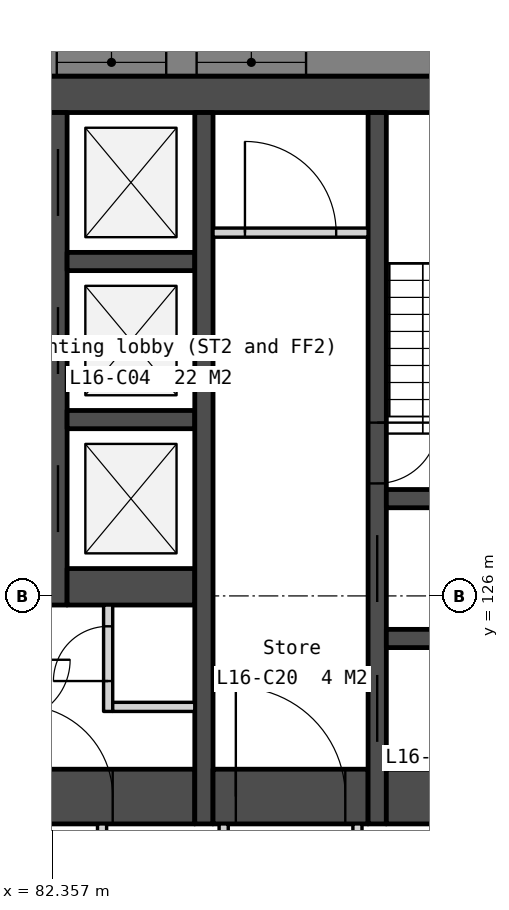
"""IFC4 building model, lengths in metres.
Left out: names, types, materials, properties, quantities, classifications, styles, units other than length and angle.
Written with IfcOpenShell. Run it as: python <this file> out.ifc"""

import sys

from ifc_helpers import new_model, si_unit, direction, frame, frame_2d, origin, place, context, subcontext, project, spatial, polyline, rectangle, outline, extrude, element, fill, save


model = new_model("IFC4")
c1 = context("Model", 3, precision=1e-05, world=origin(), true_north=direction((0.0, 1.0)))
c2 = subcontext(c1, "Body", "Model", "MODEL_VIEW")
j1 = project(units=[si_unit("LENGTHUNIT", "METRE"), si_unit("PLANEANGLEUNIT", "RADIAN")], contexts=[c1])
p1 = place(None, origin())
s1 = spatial("IfcSite", under=j1, at=p1, CompositionType="ELEMENT")
p2 = place(p1, origin())
s2 = spatial("IfcBuilding", under=s1, at=p2, CompositionType="ELEMENT")
p3 = place(p2, frame((0.0, 0.0, 70.0)))
s3 = spatial("IfcBuildingStorey", under=s2, at=p3, CompositionType="ELEMENT", Elevation=70.0)
p4 = place(p3, frame((66.0, 134.25, 0.0), z_axis=(0.0, 0.0, 1.0), x_axis=(1.0, 0.0, 0.0)))
e1 = element("IfcWall", 1, at=p4, inside=s3, PredefinedType="SOLIDWALL", context=c2, shape_type="SweptSolid", body=[
    extrude(rectangle(XDim=28.0, YDim=0.6, at=frame_2d((14.0, 0.0))), origin(), (0.0, 0.0, 1.0), 3.35),
])
p5 = place(p3, frame((81.8, 122.7, 0.0), z_axis=(0.0, 0.0, 1.0), x_axis=(1.0, 0.0, 0.0)))
e2 = element("IfcWall", 2, at=p5, inside=s3, PredefinedType="SOLIDWALL", context=c2, shape_type="SweptSolid", body=[
    extrude(rectangle(XDim=2.9, YDim=0.9, at=frame_2d((1.45, 0.0))), origin(), (0.0, 0.0, 1.0), 3.35),
])
p6 = place(p5, frame((0.05, 0.0, 0.0)))
e3 = element("IfcOpeningElement", 3, at=p6, cuts=e2, PredefinedType="OPENING", context=c2, shape_type="SweptSolid", body=[
    extrude(rectangle(XDim=1.5, YDim=2.1, at=frame_2d((0.75, 1.05))), frame((0.0, 0.46, 0.0), z_axis=(0.0, -1.0, 0.0), x_axis=(1.0, 0.0, 0.0)), (0.0, 0.0, 1.0), 0.92),
])
p7 = place(p3, frame((82.45, 133.95, 0.0), z_axis=(0.0, 0.0, 1.0), x_axis=(0.0, -1.0, 0.0)))
e4 = element("IfcWall", 4, at=p7, inside=s3, PredefinedType="SOLIDWALL", context=c2, shape_type="SweptSolid", body=[
    extrude(rectangle(XDim=8.1, YDim=0.3, at=frame_2d((4.05, 0.0))), origin(), (0.0, 0.0, 1.0), 3.35),
])
p8 = place(p7, frame((0.6, 0.0, 0.0)))
e5 = element("IfcOpeningElement", 5, at=p8, cuts=e4, PredefinedType="OPENING", context=c2, shape_type="SweptSolid", body=[
    extrude(rectangle(XDim=1.1, YDim=2.1, at=frame_2d((0.55, 1.05))), frame((0.0, 0.16, 0.0), z_axis=(0.0, -1.0, 0.0), x_axis=(1.0, 0.0, 0.0)), (0.0, 0.0, 1.0), 0.32),
])
p9 = place(p7, frame((3.2, 0.0, 0.0)))
e6 = element("IfcOpeningElement", 6, at=p9, cuts=e4, PredefinedType="OPENING", context=c2, shape_type="SweptSolid", body=[
    extrude(rectangle(XDim=1.1, YDim=2.1, at=frame_2d((0.55, 1.05))), frame((0.0, 0.16, 0.0), z_axis=(0.0, -1.0, 0.0), x_axis=(1.0, 0.0, 0.0)), (0.0, 0.0, 1.0), 0.32),
])
p10 = place(p7, frame((5.8, 0.0, 0.0)))
e7 = element("IfcOpeningElement", 7, at=p10, cuts=e4, PredefinedType="OPENING", context=c2, shape_type="SweptSolid", body=[
    extrude(rectangle(XDim=1.1, YDim=2.1, at=frame_2d((0.55, 1.05))), frame((0.0, 0.16, 0.0), z_axis=(0.0, -1.0, 0.0), x_axis=(1.0, 0.0, 0.0)), (0.0, 0.0, 1.0), 0.32),
])
for number, where, z_axis, x_axis in (
    (8, (82.6, 131.5, 0.0), (0.0, 0.0, 1.0), (1.0, 0.0, 0.0)),
    (9, (82.6, 128.9, 0.0), (0.0, 0.0, 1.0), (1.0, 0.0, 0.0)),
):
    element("IfcWall", number, at=place(p3, frame(where, z_axis=z_axis, x_axis=x_axis)), inside=s3, PredefinedType="SOLIDWALL", context=c2, shape_type="SweptSolid", body=[
        extrude(rectangle(XDim=2.1, YDim=0.3, at=frame_2d((1.05, 0.0))), origin(), (0.0, 0.0, 1.0), 3.35),
    ])
p11 = place(p3, frame((82.6, 126.15, 0.0), z_axis=(0.0, 0.0, 1.0), x_axis=(1.0, 0.0, 0.0)))
e10 = element("IfcWall", 10, at=p11, inside=s3, PredefinedType="SOLIDWALL", context=c2, shape_type="SweptSolid", body=[
    extrude(rectangle(XDim=2.1, YDim=0.6, at=frame_2d((1.05, 0.0))), origin(), (0.0, 0.0, 1.0), 3.35),
])
p12 = place(p3, frame((83.175, 122.25, 0.0), z_axis=(0.0, 0.0, 1.0), x_axis=(0.0, -1.0, 0.0)))
e11 = element("IfcWall", 11, at=p12, inside=s3, PredefinedType="PARTITIONING", context=c2, shape_type="SweptSolid", body=[
    extrude(rectangle(XDim=2.1, YDim=0.15, at=frame_2d((1.05, 0.0))), origin(), (0.0, 0.0, 1.0), 3.35),
])
p13 = place(p3, frame((83.275, 125.85, 0.0), z_axis=(0.0, 0.0, 1.0), x_axis=(0.0, -1.0, 0.0)))
e12 = element("IfcWall", 12, at=p13, inside=s3, PredefinedType="PARTITIONING", context=c2, shape_type="SweptSolid", body=[
    extrude(rectangle(XDim=1.75, YDim=0.15, at=frame_2d((0.875, 0.0))), origin(), (0.0, 0.0, 1.0), 3.35),
])
p14 = place(p13, frame((0.35, 0.0, 0.0)))
e13 = element("IfcOpeningElement", 13, at=p14, cuts=e12, PredefinedType="OPENING", context=c2, shape_type="SweptSolid", body=[
    extrude(rectangle(XDim=0.9, YDim=2.1, at=frame_2d((0.45, 1.05))), frame((0.0, 0.085, 0.0), z_axis=(0.0, -1.0, 0.0), x_axis=(1.0, 0.0, 0.0)), (0.0, 0.0, 1.0), 0.17),
])
p15 = place(p3, frame((83.35, 124.175, 0.0), z_axis=(0.0, 0.0, 1.0), x_axis=(1.0, 0.0, 0.0)))
e14 = element("IfcWall", 14, at=p15, inside=s3, PredefinedType="PARTITIONING", context=c2, shape_type="SweptSolid", body=[
    extrude(rectangle(XDim=1.35, YDim=0.15, at=frame_2d((0.675, 0.0))), origin(), (0.0, 0.0, 1.0), 3.35),
])
p16 = place(p3, frame((84.85, 133.95, 0.0), z_axis=(0.0, 0.0, 1.0), x_axis=(0.0, -1.0, 0.0)))
e15 = element("IfcWall", 15, at=p16, inside=s3, PredefinedType="SOLIDWALL", context=c2, shape_type="SweptSolid", body=[
    extrude(rectangle(XDim=11.7, YDim=0.3, at=frame_2d((5.85, 0.0))), origin(), (0.0, 0.0, 1.0), 3.35),
])
p17 = place(p3, frame((85.0, 131.975, 0.0), z_axis=(0.0, 0.0, 1.0), x_axis=(1.0, 0.0, 0.0)))
e16 = element("IfcWall", 16, at=p17, inside=s3, PredefinedType="PARTITIONING", context=c2, shape_type="SweptSolid", body=[
    extrude(rectangle(XDim=2.55, YDim=0.15, at=frame_2d((1.275, 0.0))), origin(), (0.0, 0.0, 1.0), 3.35),
])
p18 = place(p17, frame((0.525, 0.0, 0.0)))
e17 = element("IfcOpeningElement", 17, at=p18, cuts=e16, PredefinedType="OPENING", context=c2, shape_type="SweptSolid", body=[
    extrude(rectangle(XDim=1.5, YDim=2.1, at=frame_2d((0.75, 1.05))), frame((0.0, 0.085, 0.0), z_axis=(0.0, -1.0, 0.0), x_axis=(1.0, 0.0, 0.0)), (0.0, 0.0, 1.0), 0.17),
])
p19 = place(p3, frame((85.0, 122.7, 0.0), z_axis=(0.0, 0.0, 1.0), x_axis=(1.0, 0.0, 0.0)))
e18 = element("IfcWall", 18, at=p19, inside=s3, PredefinedType="SOLIDWALL", context=c2, shape_type="SweptSolid", body=[
    extrude(rectangle(XDim=2.55, YDim=0.9, at=frame_2d((1.275, 0.0))), origin(), (0.0, 0.0, 1.0), 3.35),
])
p20 = place(p19, frame((0.375, 0.0, 0.0)))
e19 = element("IfcOpeningElement", 19, at=p20, cuts=e18, PredefinedType="OPENING", context=c2, shape_type="SweptSolid", body=[
    extrude(rectangle(XDim=1.8, YDim=2.1, at=frame_2d((0.9, 1.05))), frame((0.0, 0.46, 0.0), z_axis=(0.0, -1.0, 0.0), x_axis=(1.0, 0.0, 0.0)), (0.0, 0.0, 1.0), 0.92),
])
p21 = place(p3, frame((85.175, 122.25, 0.0), z_axis=(0.0, 0.0, 1.0), x_axis=(0.0, -1.0, 0.0)))
e20 = element("IfcWall", 20, at=p21, inside=s3, PredefinedType="PARTITIONING", context=c2, shape_type="SweptSolid", body=[
    extrude(rectangle(XDim=2.1, YDim=0.15, at=frame_2d((1.05, 0.0))), origin(), (0.0, 0.0, 1.0), 3.35),
])
p22 = place(p21, frame((0.55, 0.0, 0.0)))
e21 = element("IfcOpeningElement", 21, at=p22, cuts=e20, PredefinedType="OPENING", context=c2, shape_type="SweptSolid", body=[
    extrude(rectangle(XDim=1.0, YDim=2.1, at=frame_2d((0.5, 1.05))), frame((0.0, 0.085, 0.0), z_axis=(0.0, -1.0, 0.0), x_axis=(1.0, 0.0, 0.0)), (0.0, 0.0, 1.0), 0.17),
])
p23 = place(p3, frame((87.375, 122.25, 0.0), z_axis=(0.0, 0.0, 1.0), x_axis=(0.0, -1.0, 0.0)))
e22 = element("IfcWall", 22, at=p23, inside=s3, PredefinedType="PARTITIONING", context=c2, shape_type="SweptSolid", body=[
    extrude(rectangle(XDim=2.1, YDim=0.15, at=frame_2d((1.05, 0.0))), origin(), (0.0, 0.0, 1.0), 3.35),
])
p24 = place(p3, frame((87.7, 133.95, 0.0), z_axis=(0.0, 0.0, 1.0), x_axis=(0.0, -1.0, 0.0)))
e23 = element("IfcWall", 23, at=p24, inside=s3, PredefinedType="SOLIDWALL", context=c2, shape_type="SweptSolid", body=[
    extrude(rectangle(XDim=11.7, YDim=0.3, at=frame_2d((5.85, 0.0))), origin(), (0.0, 0.0, 1.0), 3.35),
])
p25 = place(p24, frame((6.95, 0.0, 0.0)))
e24 = element("IfcOpeningElement", 24, at=p25, cuts=e23, PredefinedType="OPENING", context=c2, shape_type="SweptSolid", body=[
    extrude(rectangle(XDim=1.1, YDim=2.1, at=frame_2d((0.55, 1.05))), frame((0.0, 0.16, 0.0), z_axis=(0.0, -1.0, 0.0), x_axis=(1.0, 0.0, 0.0)), (0.0, 0.0, 1.0), 0.32),
])
p26 = place(p24, frame((5.1, 0.0, 0.0)))
e25 = element("IfcOpeningElement", 25, at=p26, cuts=e23, PredefinedType="OPENING", context=c2, shape_type="SweptSolid", body=[
    extrude(rectangle(XDim=1.0, YDim=2.1, at=frame_2d((0.5, 1.05))), frame((0.0, 0.16, 0.0), z_axis=(0.0, -1.0, 0.0), x_axis=(1.0, 0.0, 0.0)), (0.0, 0.0, 1.0), 0.32),
])
p27 = place(p24, frame((9.25, 0.0, 0.0)))
e26 = element("IfcOpeningElement", 26, at=p27, cuts=e23, PredefinedType="OPENING", context=c2, shape_type="SweptSolid", body=[
    extrude(rectangle(XDim=1.1, YDim=2.1, at=frame_2d((0.55, 1.05))), frame((0.0, 0.16, 0.0), z_axis=(0.0, -1.0, 0.0), x_axis=(1.0, 0.0, 0.0)), (0.0, 0.0, 1.0), 0.32),
])
for number, where, z_axis, x_axis in (
    (27, (87.85, 127.6, 0.0), (0.0, 0.0, 1.0), (1.0, 0.0, 0.0)),
    (28, (87.85, 125.3, 0.0), (0.0, 0.0, 1.0), (1.0, 0.0, 0.0)),
):
    element("IfcWall", number, at=place(p3, frame(where, z_axis=z_axis, x_axis=x_axis)), inside=s3, PredefinedType="SOLIDWALL", context=c2, shape_type="SweptSolid", body=[
        extrude(rectangle(XDim=2.55, YDim=0.3, at=frame_2d((1.275, 0.0))), origin(), (0.0, 0.0, 1.0), 3.35),
    ])
p28 = place(p3, frame((87.85, 122.7, 0.0), z_axis=(0.0, 0.0, 1.0), x_axis=(1.0, 0.0, 0.0)))
e29 = element("IfcWall", 29, at=p28, inside=s3, PredefinedType="SOLIDWALL", context=c2, shape_type="SweptSolid", body=[
    extrude(rectangle(XDim=2.55, YDim=0.9, at=frame_2d((1.275, 0.0))), origin(), (0.0, 0.0, 1.0), 3.35),
])
p29 = place(p3, frame((102.4, 134.775, -0.15), z_axis=(0.0, 0.0, 1.0), x_axis=(-1.0, 0.0, 0.0)))
e30 = element("IfcWall", 30, at=p29, inside=s3, PredefinedType="SOLIDWALL", context=c2, shape_type="SweptSolid", body=[
    extrude(outline(polyline([(44.8, 0.0), (44.8, 3.5), (0.0, 3.5), (0.0, 0.0), (44.8, 0.0)])), frame((0.0, 0.225, 0.0), z_axis=(0.0, -1.0, 0.0), x_axis=(1.0, 0.0, 0.0)), (0.0, 0.0, 1.0), 0.45),
])
p30 = place(p29, frame((0.786, 0.0, 1.05)))
e31 = element("IfcOpeningElement", 31, at=p30, cuts=e30, PredefinedType="OPENING", context=c2, shape_type="SweptSolid", body=[
    extrude(rectangle(XDim=1.2, YDim=1.5, at=frame_2d((0.6, 0.75))), frame((0.0, 0.235, 0.0), z_axis=(0.0, -1.0, 0.0), x_axis=(1.0, 0.0, 0.0)), (0.0, 0.0, 1.0), 0.47),
])
p31 = place(p29, frame((6.91, 0.0, 1.05)))
e32 = element("IfcOpeningElement", 32, at=p31, cuts=e30, PredefinedType="OPENING", context=c2, shape_type="SweptSolid", body=[
    extrude(rectangle(XDim=1.8, YDim=1.5, at=frame_2d((0.9, 0.75))), frame((0.0, 0.235, 0.0), z_axis=(0.0, -1.0, 0.0), x_axis=(1.0, 0.0, 0.0)), (0.0, 0.0, 1.0), 0.47),
])
p32 = place(p29, frame((9.21, 0.0, 1.05)))
e33 = element("IfcOpeningElement", 33, at=p32, cuts=e30, PredefinedType="OPENING", context=c2, shape_type="SweptSolid", body=[
    extrude(rectangle(XDim=1.8, YDim=1.5, at=frame_2d((0.9, 0.75))), frame((0.0, 0.235, 0.0), z_axis=(0.0, -1.0, 0.0), x_axis=(1.0, 0.0, 0.0)), (0.0, 0.0, 1.0), 0.47),
])
p33 = place(p29, frame((15.87, 0.0, 1.05)))
e34 = element("IfcOpeningElement", 34, at=p33, cuts=e30, PredefinedType="OPENING", context=c2, shape_type="SweptSolid", body=[
    extrude(rectangle(XDim=1.8, YDim=1.5, at=frame_2d((0.9, 0.75))), frame((0.0, 0.235, 0.0), z_axis=(0.0, -1.0, 0.0), x_axis=(1.0, 0.0, 0.0)), (0.0, 0.0, 1.0), 0.47),
])
p34 = place(p29, frame((18.17, 0.0, 1.05)))
e35 = element("IfcOpeningElement", 35, at=p34, cuts=e30, PredefinedType="OPENING", context=c2, shape_type="SweptSolid", body=[
    extrude(rectangle(XDim=1.8, YDim=1.5, at=frame_2d((0.9, 0.75))), frame((0.0, 0.235, 0.0), z_axis=(0.0, -1.0, 0.0), x_axis=(1.0, 0.0, 0.0)), (0.0, 0.0, 1.0), 0.47),
])
p35 = place(p29, frame((24.83, 0.0, 1.05)))
e36 = element("IfcOpeningElement", 36, at=p35, cuts=e30, PredefinedType="OPENING", context=c2, shape_type="SweptSolid", body=[
    extrude(rectangle(XDim=1.8, YDim=1.5, at=frame_2d((0.9, 0.75))), frame((0.0, 0.235, 0.0), z_axis=(0.0, -1.0, 0.0), x_axis=(1.0, 0.0, 0.0)), (0.0, 0.0, 1.0), 0.47),
])
p36 = place(p29, frame((27.13, 0.0, 1.05)))
e37 = element("IfcOpeningElement", 37, at=p36, cuts=e30, PredefinedType="OPENING", context=c2, shape_type="SweptSolid", body=[
    extrude(rectangle(XDim=1.8, YDim=1.5, at=frame_2d((0.9, 0.75))), frame((0.0, 0.235, 0.0), z_axis=(0.0, -1.0, 0.0), x_axis=(1.0, 0.0, 0.0)), (0.0, 0.0, 1.0), 0.47),
])
p37 = place(p29, frame((33.79, 0.0, 1.05)))
e38 = element("IfcOpeningElement", 38, at=p37, cuts=e30, PredefinedType="OPENING", context=c2, shape_type="SweptSolid", body=[
    extrude(rectangle(XDim=1.8, YDim=1.5, at=frame_2d((0.9, 0.75))), frame((0.0, 0.235, 0.0), z_axis=(0.0, -1.0, 0.0), x_axis=(1.0, 0.0, 0.0)), (0.0, 0.0, 1.0), 0.47),
])
p38 = place(p29, frame((36.09, 0.0, 1.05)))
e39 = element("IfcOpeningElement", 39, at=p38, cuts=e30, PredefinedType="OPENING", context=c2, shape_type="SweptSolid", body=[
    extrude(rectangle(XDim=1.8, YDim=1.5, at=frame_2d((0.9, 0.75))), frame((0.0, 0.235, 0.0), z_axis=(0.0, -1.0, 0.0), x_axis=(1.0, 0.0, 0.0)), (0.0, 0.0, 1.0), 0.47),
])
p39 = place(p29, frame((42.814, 0.0, 1.05)))
e40 = element("IfcOpeningElement", 40, at=p39, cuts=e30, PredefinedType="OPENING", context=c2, shape_type="SweptSolid", body=[
    extrude(rectangle(XDim=1.2, YDim=1.5, at=frame_2d((0.6, 0.75))), frame((0.0, 0.235, 0.0), z_axis=(0.0, -1.0, 0.0), x_axis=(1.0, 0.0, 0.0)), (0.0, 0.0, 1.0), 0.47),
])
p40 = place(p3, frame((88.435, 99.831, -0.15), z_axis=(0.0, 0.0, 1.0), x_axis=(0.500000806382, 0.866024938219, 0.0)))
e41 = element("IfcWall", 41, at=p40, inside=s3, PredefinedType="SOLIDWALL", context=c2, shape_type="SweptSolid", body=[
    extrude(outline(polyline([(34.14, 3.5), (34.14, 0.0), (0.0, 0.0), (0.0, 3.5), (34.14, 3.5)])), frame((0.0, 0.225, 0.0), z_axis=(0.0, -1.0, 0.0), x_axis=(1.0, 0.0, 0.0)), (0.0, 0.0, 1.0), 0.45),
])
p41 = place(p40, frame((5.21, 0.0, 1.05)))
e42 = element("IfcOpeningElement", 42, at=p41, cuts=e41, PredefinedType="OPENING", context=c2, shape_type="SweptSolid", body=[
    extrude(rectangle(XDim=1.8, YDim=1.5, at=frame_2d((0.9, 0.75))), frame((0.0, 0.235, 0.0), z_axis=(0.0, -1.0, 0.0), x_axis=(1.0, 0.0, 0.0)), (0.0, 0.0, 1.0), 0.47),
])
p42 = place(p40, frame((7.51, 0.0, 1.05)))
e43 = element("IfcOpeningElement", 43, at=p42, cuts=e41, PredefinedType="OPENING", context=c2, shape_type="SweptSolid", body=[
    extrude(rectangle(XDim=1.8, YDim=1.5, at=frame_2d((0.9, 0.75))), frame((0.0, 0.235, 0.0), z_axis=(0.0, -1.0, 0.0), x_axis=(1.0, 0.0, 0.0)), (0.0, 0.0, 1.0), 0.47),
])
p43 = place(p40, frame((14.17, 0.0, 1.05)))
e44 = element("IfcOpeningElement", 44, at=p43, cuts=e41, PredefinedType="OPENING", context=c2, shape_type="SweptSolid", body=[
    extrude(rectangle(XDim=1.8, YDim=1.5, at=frame_2d((0.9, 0.75))), frame((0.0, 0.235, 0.0), z_axis=(0.0, -1.0, 0.0), x_axis=(1.0, 0.0, 0.0)), (0.0, 0.0, 1.0), 0.47),
])
p44 = place(p40, frame((16.47, 0.0, 1.05)))
e45 = element("IfcOpeningElement", 45, at=p44, cuts=e41, PredefinedType="OPENING", context=c2, shape_type="SweptSolid", body=[
    extrude(rectangle(XDim=1.8, YDim=1.5, at=frame_2d((0.9, 0.75))), frame((0.0, 0.235, 0.0), z_axis=(0.0, -1.0, 0.0), x_axis=(1.0, 0.0, 0.0)), (0.0, 0.0, 1.0), 0.47),
])
p45 = place(p40, frame((23.13, 0.0, 1.05)))
e46 = element("IfcOpeningElement", 46, at=p45, cuts=e41, PredefinedType="OPENING", context=c2, shape_type="SweptSolid", body=[
    extrude(rectangle(XDim=1.8, YDim=1.5, at=frame_2d((0.9, 0.75))), frame((0.0, 0.235, 0.0), z_axis=(0.0, -1.0, 0.0), x_axis=(1.0, 0.0, 0.0)), (0.0, 0.0, 1.0), 0.47),
])
p46 = place(p40, frame((25.43, 0.0, 1.05)))
e47 = element("IfcOpeningElement", 47, at=p46, cuts=e41, PredefinedType="OPENING", context=c2, shape_type="SweptSolid", body=[
    extrude(rectangle(XDim=1.8, YDim=1.5, at=frame_2d((0.9, 0.75))), frame((0.0, 0.235, 0.0), z_axis=(0.0, -1.0, 0.0), x_axis=(1.0, 0.0, 0.0)), (0.0, 0.0, 1.0), 0.47),
])
p47 = place(p40, frame((32.154, 0.0, 1.05)))
e48 = element("IfcOpeningElement", 48, at=p47, cuts=e41, PredefinedType="OPENING", context=c2, shape_type="SweptSolid", body=[
    extrude(rectangle(XDim=1.2, YDim=1.5, at=frame_2d((0.6, 0.75))), frame((0.0, 0.235, 0.0), z_axis=(0.0, -1.0, 0.0), x_axis=(1.0, 0.0, 0.0)), (0.0, 0.0, 1.0), 0.47),
])
p48 = place(p8, origin())
e49 = element("IfcDoor", 49, at=p48, inside=s3, OperationType="SLIDING_TO_LEFT", PredefinedType="DOOR", context=c2, shape_type="SweptSolid", body=[
    extrude(rectangle(XDim=1.1, YDim=2.1, at=frame_2d((0.55, 1.05))), frame((0.0, 0.025, 0.0), z_axis=(0.0, -1.0, 0.0), x_axis=(1.0, 0.0, 0.0)), (0.0, 0.0, 1.0), 0.05),
])
fill(e5, e49)
p49 = place(p9, origin())
e50 = element("IfcDoor", 50, at=p49, inside=s3, OperationType="SLIDING_TO_LEFT", PredefinedType="DOOR", context=c2, shape_type="SweptSolid", body=[
    extrude(rectangle(XDim=1.1, YDim=2.1, at=frame_2d((0.55, 1.05))), frame((0.0, 0.025, 0.0), z_axis=(0.0, -1.0, 0.0), x_axis=(1.0, 0.0, 0.0)), (0.0, 0.0, 1.0), 0.05),
])
fill(e6, e50)
p50 = place(p10, origin())
e51 = element("IfcDoor", 51, at=p50, inside=s3, OperationType="SLIDING_TO_LEFT", PredefinedType="DOOR", context=c2, shape_type="SweptSolid", body=[
    extrude(rectangle(XDim=1.1, YDim=2.1, at=frame_2d((0.55, 1.05))), frame((0.0, 0.025, 0.0), z_axis=(0.0, -1.0, 0.0), x_axis=(1.0, 0.0, 0.0)), (0.0, 0.0, 1.0), 0.05),
])
fill(e7, e51)
p51 = place(p25, origin())
e52 = element("IfcDoor", 52, at=p51, inside=s3, OperationType="SLIDING_TO_LEFT", PredefinedType="DOOR", context=c2, shape_type="SweptSolid", body=[
    extrude(rectangle(XDim=1.1, YDim=2.1, at=frame_2d((0.55, 1.05))), frame((0.0, 0.025, 0.0), z_axis=(0.0, -1.0, 0.0), x_axis=(1.0, 0.0, 0.0)), (0.0, 0.0, 1.0), 0.05),
])
fill(e24, e52)
p52 = place(p20, origin())
e53 = element("IfcDoor", 53, at=p52, inside=s3, OperationType="DOUBLE_DOOR_DOUBLE_SWING", PredefinedType="DOOR", context=c2, shape_type="SweptSolid", body=[
    extrude(rectangle(XDim=1.8, YDim=2.1, at=frame_2d((0.9, 1.05))), frame((0.0, 0.025, 0.0), z_axis=(0.0, -1.0, 0.0), x_axis=(1.0, 0.0, 0.0)), (0.0, 0.0, 1.0), 0.05),
])
fill(e19, e53)
p53 = place(p6, origin())
e54 = element("IfcDoor", 54, at=p53, inside=s3, OperationType="DOUBLE_DOOR_DOUBLE_SWING", PredefinedType="DOOR", context=c2, shape_type="SweptSolid", body=[
    extrude(rectangle(XDim=1.5, YDim=2.1, at=frame_2d((0.75, 1.05))), frame((0.0, 0.025, 0.0), z_axis=(0.0, -1.0, 0.0), x_axis=(1.0, 0.0, 0.0)), (0.0, 0.0, 1.0), 0.05),
])
fill(e3, e54)
p54 = place(p14, origin())
e55 = element("IfcDoor", 55, at=p54, inside=s3, OperationType="SINGLE_SWING_RIGHT", PredefinedType="DOOR", context=c2, shape_type="SweptSolid", body=[
    extrude(rectangle(XDim=0.9, YDim=2.1, at=frame_2d((0.45, 1.05))), frame((0.0, 0.025, 0.0), z_axis=(0.0, -1.0, 0.0), x_axis=(1.0, 0.0, 0.0)), (0.0, 0.0, 1.0), 0.05),
])
fill(e13, e55)
p55 = place(p18, origin())
e56 = element("IfcDoor", 56, at=p55, inside=s3, OperationType="DOUBLE_DOOR_DOUBLE_SWING", PredefinedType="DOOR", context=c2, shape_type="SweptSolid", body=[
    extrude(rectangle(XDim=1.5, YDim=2.1, at=frame_2d((0.75, 1.05))), frame((0.0, 0.025, 0.0), z_axis=(0.0, -1.0, 0.0), x_axis=(1.0, 0.0, 0.0)), (0.0, 0.0, 1.0), 0.05),
])
fill(e17, e56)
p56 = place(p26, origin())
e57 = element("IfcDoor", 57, at=p56, inside=s3, OperationType="SINGLE_SWING_LEFT", PredefinedType="DOOR", context=c2, shape_type="SweptSolid", body=[
    extrude(rectangle(XDim=1.0, YDim=2.1, at=frame_2d((0.5, 1.05))), frame((0.0, 0.025, 0.0), z_axis=(0.0, -1.0, 0.0), x_axis=(1.0, 0.0, 0.0)), (0.0, 0.0, 1.0), 0.05),
])
fill(e25, e57)
p57 = place(p27, origin())
e58 = element("IfcDoor", 58, at=p57, inside=s3, OperationType="SLIDING_TO_LEFT", PredefinedType="DOOR", context=c2, shape_type="SweptSolid", body=[
    extrude(rectangle(XDim=1.1, YDim=2.1, at=frame_2d((0.55, 1.05))), frame((0.0, 0.025, 0.0), z_axis=(0.0, -1.0, 0.0), x_axis=(1.0, 0.0, 0.0)), (0.0, 0.0, 1.0), 0.05),
])
fill(e26, e58)
p58 = place(p33, origin())
e59 = element("IfcWindow", 59, at=p58, inside=s3, PartitioningType="SINGLE_PANEL", PredefinedType="WINDOW", context=c2, shape_type="SweptSolid", body=[
    extrude(rectangle(XDim=1.8, YDim=1.5, at=frame_2d((0.9, 0.75))), frame((0.0, 0.03, 0.0), z_axis=(0.0, -1.0, 0.0), x_axis=(1.0, 0.0, 0.0)), (0.0, 0.0, 1.0), 0.06),
])
fill(e34, e59)
p59 = place(p34, origin())
e60 = element("IfcWindow", 60, at=p59, inside=s3, PartitioningType="SINGLE_PANEL", PredefinedType="WINDOW", context=c2, shape_type="SweptSolid", body=[
    extrude(rectangle(XDim=1.8, YDim=1.5, at=frame_2d((0.9, 0.75))), frame((0.0, 0.03, 0.0), z_axis=(0.0, -1.0, 0.0), x_axis=(1.0, 0.0, 0.0)), (0.0, 0.0, 1.0), 0.06),
])
fill(e35, e60)
save(model, sys.argv[1])
